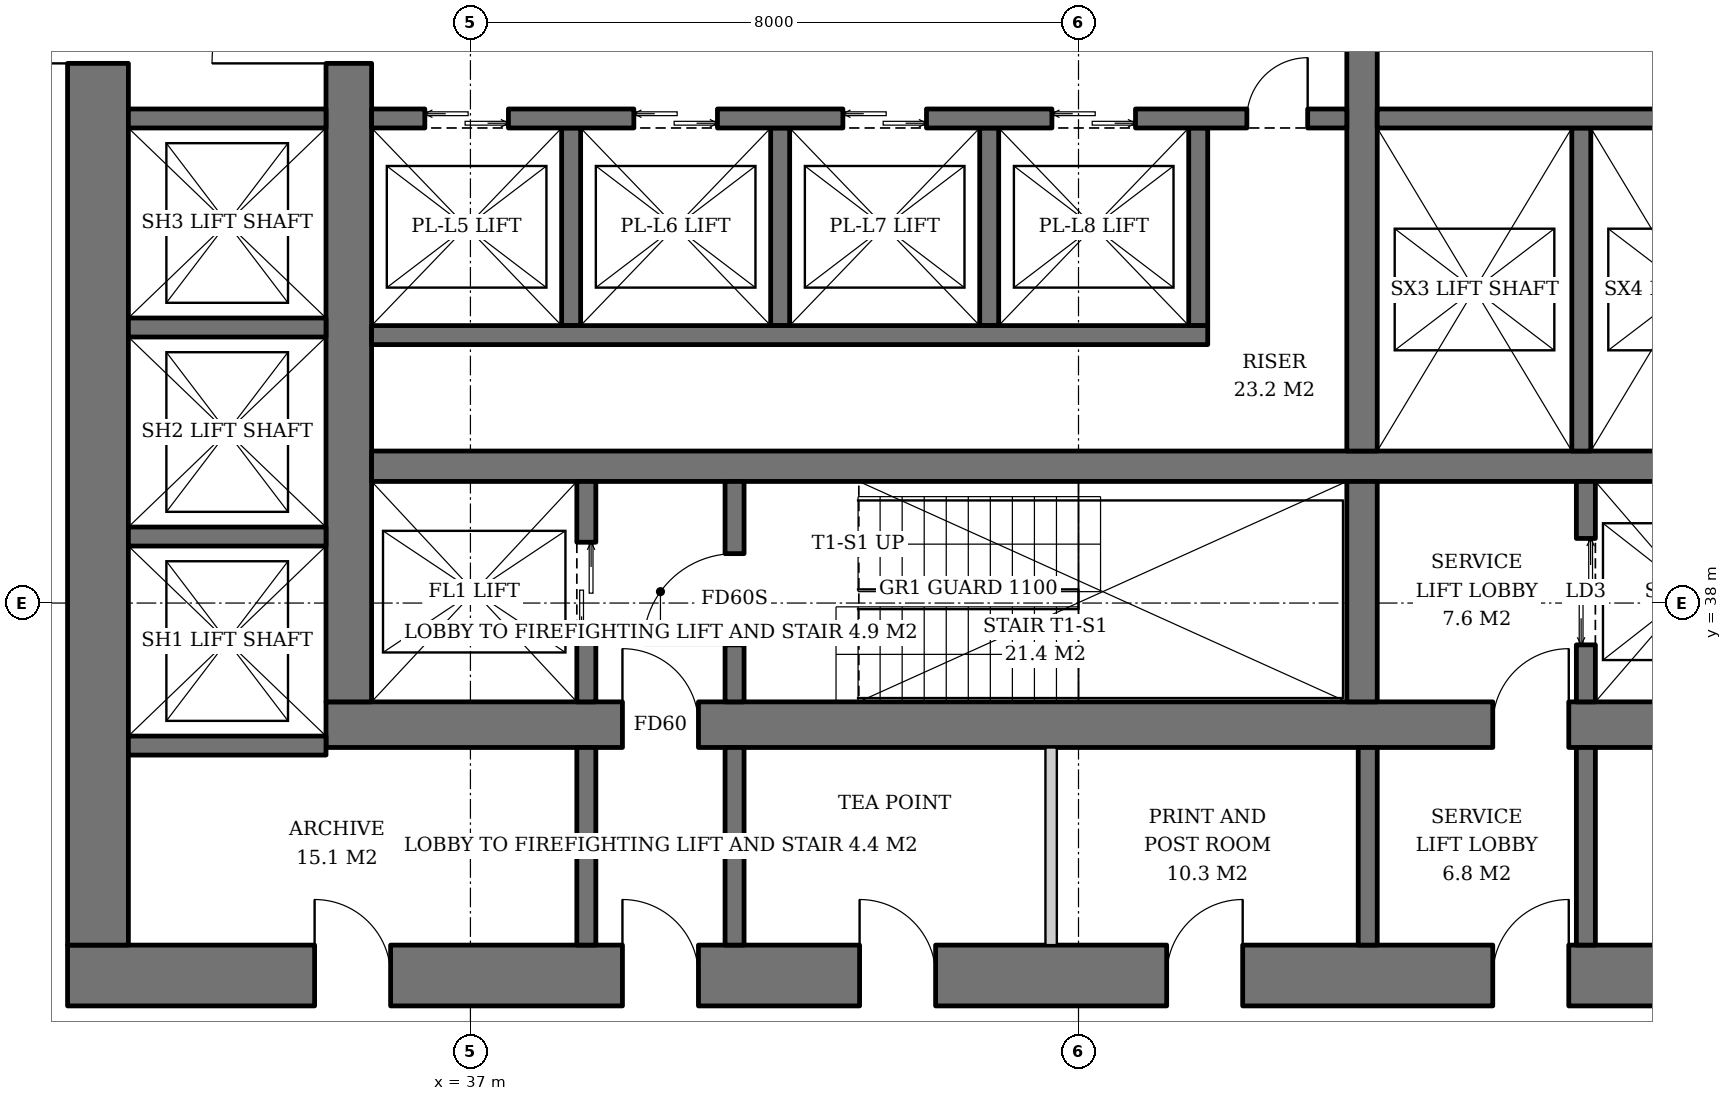
"""IFC4 building model, lengths in metres.
Left out: names, types, materials, properties, quantities, classifications, styles, units other than length and angle.
Written with IfcOpenShell. Run it as: python <this file> out.ifc"""

import sys

from ifc_helpers import new_model, si_unit, direction, frame, frame_2d, origin, place, context, subcontext, project, spatial, rectangle, extrude, element, fill, save


model = new_model("IFC4")
c1 = context("Model", 3, precision=1e-05, world=origin(), true_north=direction((0.0, 1.0)))
c2 = subcontext(c1, "Body", "Model", "MODEL_VIEW")
j1 = project(units=[si_unit("LENGTHUNIT", "METRE"), si_unit("PLANEANGLEUNIT", "RADIAN")], contexts=[c1])
p1 = place(None, origin())
s1 = spatial("IfcSite", under=j1, at=p1, CompositionType="ELEMENT")
p2 = place(p1, origin())
s2 = spatial("IfcBuilding", under=s1, at=p2, CompositionType="ELEMENT")
p3 = place(p2, frame((0.0, 0.0, 74.2)))
s3 = spatial("IfcBuildingStorey", under=s2, at=p3, CompositionType="ELEMENT", Elevation=74.2)
p4 = place(p3, frame((35.1, 36.4, 0.0), z_axis=(0.0, 0.0, 1.0), x_axis=(1.0, 0.0, 0.0)))
e1 = element("IfcWall", 1, at=p4, inside=s3, PredefinedType="SHEAR", context=c2, shape_type="SweptSolid", body=[
    extrude(rectangle(XDim=19.8, YDim=0.6, at=frame_2d((9.9, 0.0))), origin(), (0.0, 0.0, 1.0), 3.8),
])
p5 = place(p4, frame((3.9, 0.0, 0.0)))
e2 = element("IfcOpeningElement", 2, at=p5, cuts=e1, PredefinedType="OPENING", context=c2, shape_type="SweptSolid", body=[
    extrude(rectangle(XDim=1.0, YDim=2.1, at=frame_2d((0.5, 1.05))), frame((0.0, 0.31, 0.0), z_axis=(0.0, -1.0, 0.0), x_axis=(1.0, 0.0, 0.0)), (0.0, 0.0, 1.0), 0.62),
])
p6 = place(p4, frame((15.35, 0.0, 0.0)))
e3 = element("IfcOpeningElement", 3, at=p6, cuts=e1, PredefinedType="OPENING", context=c2, shape_type="SweptSolid", body=[
    extrude(rectangle(XDim=1.0, YDim=2.1, at=frame_2d((0.5, 1.05))), frame((0.0, 0.31, 0.0), z_axis=(0.0, -1.0, 0.0), x_axis=(1.0, 0.0, 0.0)), (0.0, 0.0, 1.0), 0.62),
])
p7 = place(p3, frame((35.4, 36.7, 0.0), z_axis=(0.0, 0.0, 1.0), x_axis=(0.0, 1.0, 0.0)))
e4 = element("IfcWall", 4, at=p7, inside=s3, PredefinedType="SHEAR", context=c2, shape_type="SweptSolid", body=[
    extrude(rectangle(XDim=18.6, YDim=0.6, at=frame_2d((9.3, 0.0))), origin(), (0.0, 0.0, 1.0), 3.8),
])
p8 = place(p7, frame((8.4, 0.0, 0.0)))
e5 = element("IfcOpeningElement", 5, at=p8, cuts=e4, PredefinedType="OPENING", context=c2, shape_type="SweptSolid", body=[
    extrude(rectangle(XDim=1.8, YDim=2.4, at=frame_2d((0.9, 1.2))), frame((0.0, 0.31, 0.0), z_axis=(0.0, -1.0, 0.0), x_axis=(1.0, 0.0, 0.0)), (0.0, 0.0, 1.0), 0.62),
])
p9 = place(p3, frame((31.7, 33.1, 0.0), z_axis=(0.0, 0.0, 1.0), x_axis=(1.0, 0.0, 0.0)))
e6 = element("IfcWall", 6, at=p9, inside=s3, PredefinedType="SHEAR", context=c2, shape_type="SweptSolid", body=[
    extrude(rectangle(XDim=26.6, YDim=0.8, at=frame_2d((13.3, 0.0))), origin(), (0.0, 0.0, 1.0), 3.8),
])
p10 = place(p9, frame((7.3, 0.0, 0.0)))
e7 = element("IfcOpeningElement", 7, at=p10, cuts=e6, PredefinedType="OPENING", context=c2, shape_type="SweptSolid", body=[
    extrude(rectangle(XDim=1.0, YDim=2.1, at=frame_2d((0.5, 1.05))), frame((0.0, 0.41, 0.0), z_axis=(0.0, -1.0, 0.0), x_axis=(1.0, 0.0, 0.0)), (0.0, 0.0, 1.0), 0.82),
])
p11 = place(p9, frame((18.75, 0.0, 0.0)))
e8 = element("IfcOpeningElement", 8, at=p11, cuts=e6, PredefinedType="OPENING", context=c2, shape_type="SweptSolid", body=[
    extrude(rectangle(XDim=1.0, YDim=2.1, at=frame_2d((0.5, 1.05))), frame((0.0, 0.41, 0.0), z_axis=(0.0, -1.0, 0.0), x_axis=(1.0, 0.0, 0.0)), (0.0, 0.0, 1.0), 0.82),
])
p12 = place(p9, frame((3.25, 0.0, 0.0)))
e9 = element("IfcOpeningElement", 9, at=p12, cuts=e6, PredefinedType="OPENING", context=c2, shape_type="SweptSolid", body=[
    extrude(rectangle(XDim=1.0, YDim=2.1, at=frame_2d((0.5, 1.05))), frame((0.0, 0.41, 0.0), z_axis=(0.0, -1.0, 0.0), x_axis=(1.0, 0.0, 0.0)), (0.0, 0.0, 1.0), 0.82),
])
p13 = place(p9, frame((10.42, 0.0, 0.0)))
e10 = element("IfcOpeningElement", 10, at=p13, cuts=e6, PredefinedType="OPENING", context=c2, shape_type="SweptSolid", body=[
    extrude(rectangle(XDim=1.0, YDim=2.1, at=frame_2d((0.5, 1.05))), frame((0.0, 0.41, 0.0), z_axis=(0.0, -1.0, 0.0), x_axis=(1.0, 0.0, 0.0)), (0.0, 0.0, 1.0), 0.82),
])
p14 = place(p9, frame((14.46, 0.0, 0.0)))
e11 = element("IfcOpeningElement", 11, at=p14, cuts=e6, PredefinedType="OPENING", context=c2, shape_type="SweptSolid", body=[
    extrude(rectangle(XDim=1.0, YDim=2.1, at=frame_2d((0.5, 1.05))), frame((0.0, 0.41, 0.0), z_axis=(0.0, -1.0, 0.0), x_axis=(1.0, 0.0, 0.0)), (0.0, 0.0, 1.0), 0.82),
])
p15 = place(p9, frame((22.45, 0.0, 0.0)))
e12 = element("IfcOpeningElement", 12, at=p15, cuts=e6, PredefinedType="OPENING", context=c2, shape_type="SweptSolid", body=[
    extrude(rectangle(XDim=1.0, YDim=2.1, at=frame_2d((0.5, 1.05))), frame((0.0, 0.41, 0.0), z_axis=(0.0, -1.0, 0.0), x_axis=(1.0, 0.0, 0.0)), (0.0, 0.0, 1.0), 0.82),
])
p16 = place(p3, frame((32.1, 33.5, 0.0), z_axis=(0.0, 0.0, 1.0), x_axis=(0.0, 1.0, 0.0)))
e13 = element("IfcWall", 13, at=p16, inside=s3, PredefinedType="SHEAR", context=c2, shape_type="SweptSolid", body=[
    extrude(rectangle(XDim=25.0, YDim=0.8, at=frame_2d((12.5, 0.0))), origin(), (0.0, 0.0, 1.0), 3.8),
])
p17 = place(p16, frame((11.6, 0.0, 0.0)))
e14 = element("IfcOpeningElement", 14, at=p17, cuts=e13, PredefinedType="OPENING", context=c2, shape_type="SweptSolid", body=[
    extrude(rectangle(XDim=1.8, YDim=2.4, at=frame_2d((0.9, 1.2))), frame((0.0, 0.41, 0.0), z_axis=(0.0, -1.0, 0.0), x_axis=(1.0, 0.0, 0.0)), (0.0, 0.0, 1.0), 0.82),
])
p18 = place(p3, frame((35.7, 39.8, 0.0), z_axis=(0.0, 0.0, 1.0), x_axis=(1.0, 0.0, 0.0)))
e15 = element("IfcWall", 15, at=p18, inside=s3, PredefinedType="SHEAR", context=c2, shape_type="SweptSolid", body=[
    extrude(rectangle(XDim=18.6, YDim=0.4, at=frame_2d((9.3, 0.0))), origin(), (0.0, 0.0, 1.0), 3.8),
])
p19 = place(p3, frame((48.73, 36.7, 0.0), z_axis=(0.0, 0.0, 1.0), x_axis=(0.0, 1.0, 0.0)))
e16 = element("IfcWall", 16, at=p19, inside=s3, PredefinedType="SHEAR", context=c2, shape_type="SweptSolid", body=[
    extrude(rectangle(XDim=2.9, YDim=0.4, at=frame_2d((1.45, 0.0))), origin(), (0.0, 0.0, 1.0), 3.8),
])
p20 = place(p3, frame((48.73, 40.0, 0.0), z_axis=(0.0, 0.0, 1.0), x_axis=(0.0, 1.0, 0.0)))
e17 = element("IfcWall", 17, at=p20, inside=s3, PredefinedType="SHEAR", context=c2, shape_type="SweptSolid", body=[
    extrude(rectangle(XDim=12.0, YDim=0.4, at=frame_2d((6.0, 0.0))), origin(), (0.0, 0.0, 1.0), 3.8),
])
p21 = place(p3, frame((38.525, 36.7, 0.0), z_axis=(0.0, 0.0, 1.0), x_axis=(0.0, 1.0, 0.0)))
e18 = element("IfcWall", 18, at=p21, inside=s3, PredefinedType="SHEAR", context=c2, shape_type="SweptSolid", body=[
    extrude(rectangle(XDim=2.9, YDim=0.25, at=frame_2d((1.45, 0.0))), origin(), (0.0, 0.0, 1.0), 3.8),
])
p22 = place(p21, frame((0.8, 0.0, 0.0)))
e19 = element("IfcOpeningElement", 19, at=p22, cuts=e18, PredefinedType="OPENING", context=c2, shape_type="SweptSolid", body=[
    extrude(rectangle(XDim=1.3, YDim=2.2, at=frame_2d((0.65, 1.1))), frame((0.0, 0.135, 0.0), z_axis=(0.0, -1.0, 0.0), x_axis=(1.0, 0.0, 0.0)), (0.0, 0.0, 1.0), 0.27),
])
p23 = place(p3, frame((40.475, 36.7, 0.0), z_axis=(0.0, 0.0, 1.0), x_axis=(0.0, 1.0, 0.0)))
e20 = element("IfcWall", 20, at=p23, inside=s3, PredefinedType="SHEAR", context=c2, shape_type="SweptSolid", body=[
    extrude(rectangle(XDim=2.9, YDim=0.25, at=frame_2d((1.45, 0.0))), origin(), (0.0, 0.0, 1.0), 3.8),
])
p24 = place(p23, frame((0.75, 0.0, 0.0)))
e21 = element("IfcOpeningElement", 21, at=p24, cuts=e20, PredefinedType="OPENING", context=c2, shape_type="SweptSolid", body=[
    extrude(rectangle(XDim=1.2, YDim=2.1, at=frame_2d((0.6, 1.05))), frame((0.0, 0.135, 0.0), z_axis=(0.0, -1.0, 0.0), x_axis=(1.0, 0.0, 0.0)), (0.0, 0.0, 1.0), 0.27),
])
p25 = place(p3, frame((51.675, 36.7, 0.0), z_axis=(0.0, 0.0, 1.0), x_axis=(0.0, 1.0, 0.0)))
e22 = element("IfcWall", 22, at=p25, inside=s3, PredefinedType="SHEAR", context=c2, shape_type="SweptSolid", body=[
    extrude(rectangle(XDim=2.9, YDim=0.25, at=frame_2d((1.45, 0.0))), origin(), (0.0, 0.0, 1.0), 3.8),
])
p26 = place(p25, frame((0.75, 0.0, 0.0)))
e23 = element("IfcOpeningElement", 23, at=p26, cuts=e22, PredefinedType="OPENING", context=c2, shape_type="SweptSolid", body=[
    extrude(rectangle(XDim=1.4, YDim=2.4, at=frame_2d((0.7, 1.2))), frame((0.0, 0.135, 0.0), z_axis=(0.0, -1.0, 0.0), x_axis=(1.0, 0.0, 0.0)), (0.0, 0.0, 1.0), 0.27),
])
for number, where, z_axis, x_axis in (
    (24, (38.325, 44.25, 0.0), (0.0, 0.0, 1.0), (0.0, -1.0, 0.0)),
    (25, (41.075, 44.25, 0.0), (0.0, 0.0, 1.0), (0.0, -1.0, 0.0)),
    (26, (43.825, 44.25, 0.0), (0.0, 0.0, 1.0), (0.0, -1.0, 0.0)),
    (27, (46.575, 44.25, 0.0), (0.0, 0.0, 1.0), (0.0, -1.0, 0.0)),
):
    element("IfcWall", number, at=place(p3, frame(where, z_axis=z_axis, x_axis=x_axis)), inside=s3, PredefinedType="SHEAR", context=c2, shape_type="SweptSolid", body=[
        extrude(rectangle(XDim=2.6, YDim=0.25, at=frame_2d((1.3, 0.0))), origin(), (0.0, 0.0, 1.0), 3.8),
    ])
p27 = place(p3, frame((35.7, 41.525, 0.0), z_axis=(0.0, 0.0, 1.0), x_axis=(1.0, 0.0, 0.0)))
e28 = element("IfcWall", 28, at=p27, inside=s3, PredefinedType="SHEAR", context=c2, shape_type="SweptSolid", body=[
    extrude(rectangle(XDim=11.0, YDim=0.25, at=frame_2d((5.5, 0.0))), origin(), (0.0, 0.0, 1.0), 3.8),
])
p28 = place(p3, frame((35.7, 44.375, 0.0), z_axis=(0.0, 0.0, 1.0), x_axis=(1.0, 0.0, 0.0)))
e29 = element("IfcWall", 29, at=p28, inside=s3, PredefinedType="SHEAR", context=c2, shape_type="SweptSolid", body=[
    extrude(rectangle(XDim=12.83, YDim=0.25, at=frame_2d((6.415, 0.0))), origin(), (0.0, 0.0, 1.0), 3.8),
])
p29 = place(p28, frame((0.7, 0.0, 0.0)))
e30 = element("IfcOpeningElement", 30, at=p29, cuts=e29, PredefinedType="OPENING", context=c2, shape_type="SweptSolid", body=[
    extrude(rectangle(XDim=1.1, YDim=2.2, at=frame_2d((0.55, 1.1))), frame((0.0, 0.135, 0.0), z_axis=(0.0, -1.0, 0.0), x_axis=(1.0, 0.0, 0.0)), (0.0, 0.0, 1.0), 0.27),
])
p30 = place(p28, frame((3.45, 0.0, 0.0)))
e31 = element("IfcOpeningElement", 31, at=p30, cuts=e29, PredefinedType="OPENING", context=c2, shape_type="SweptSolid", body=[
    extrude(rectangle(XDim=1.1, YDim=2.2, at=frame_2d((0.55, 1.1))), frame((0.0, 0.135, 0.0), z_axis=(0.0, -1.0, 0.0), x_axis=(1.0, 0.0, 0.0)), (0.0, 0.0, 1.0), 0.27),
])
p31 = place(p28, frame((6.2, 0.0, 0.0)))
e32 = element("IfcOpeningElement", 32, at=p31, cuts=e29, PredefinedType="OPENING", context=c2, shape_type="SweptSolid", body=[
    extrude(rectangle(XDim=1.1, YDim=2.2, at=frame_2d((0.55, 1.1))), frame((0.0, 0.135, 0.0), z_axis=(0.0, -1.0, 0.0), x_axis=(1.0, 0.0, 0.0)), (0.0, 0.0, 1.0), 0.27),
])
p32 = place(p28, frame((8.95, 0.0, 0.0)))
e33 = element("IfcOpeningElement", 33, at=p32, cuts=e29, PredefinedType="OPENING", context=c2, shape_type="SweptSolid", body=[
    extrude(rectangle(XDim=1.1, YDim=2.2, at=frame_2d((0.55, 1.1))), frame((0.0, 0.135, 0.0), z_axis=(0.0, -1.0, 0.0), x_axis=(1.0, 0.0, 0.0)), (0.0, 0.0, 1.0), 0.27),
])
p33 = place(p28, frame((11.515, 0.0, 0.0)))
e34 = element("IfcOpeningElement", 34, at=p33, cuts=e29, PredefinedType="OPENING", context=c2, shape_type="SweptSolid", body=[
    extrude(rectangle(XDim=0.8, YDim=2.0, at=frame_2d((0.4, 1.0))), frame((0.0, 0.135, 0.0), z_axis=(0.0, -1.0, 0.0), x_axis=(1.0, 0.0, 0.0)), (0.0, 0.0, 1.0), 0.27),
])
p34 = place(p3, frame((51.615, 44.25, 0.0), z_axis=(0.0, 0.0, 1.0), x_axis=(0.0, -1.0, 0.0)))
e35 = element("IfcWall", 35, at=p34, inside=s3, PredefinedType="SHEAR", context=c2, shape_type="SweptSolid", body=[
    extrude(rectangle(XDim=4.25, YDim=0.25, at=frame_2d((2.125, 0.0))), origin(), (0.0, 0.0, 1.0), 3.8),
])
p35 = place(p3, frame((48.93, 44.375, 0.0), z_axis=(0.0, 0.0, 1.0), x_axis=(1.0, 0.0, 0.0)))
e36 = element("IfcWall", 36, at=p35, inside=s3, PredefinedType="SHEAR", context=c2, shape_type="SweptSolid", body=[
    extrude(rectangle(XDim=5.37, YDim=0.25, at=frame_2d((2.685, 0.0))), origin(), (0.0, 0.0, 1.0), 3.8),
])
for number, where, z_axis, x_axis in (
    (37, (32.5, 36.125, 0.0), (0.0, 0.0, 1.0), (1.0, 0.0, 0.0)),
    (38, (32.5, 38.875, 0.0), (0.0, 0.0, 1.0), (1.0, 0.0, 0.0)),
    (39, (32.5, 41.625, 0.0), (0.0, 0.0, 1.0), (1.0, 0.0, 0.0)),
    (40, (32.5, 44.375, 0.0), (0.0, 0.0, 1.0), (1.0, 0.0, 0.0)),
):
    element("IfcWall", number, at=place(p3, frame(where, z_axis=z_axis, x_axis=x_axis)), inside=s3, PredefinedType="SHEAR", context=c2, shape_type="SweptSolid", body=[
        extrude(rectangle(XDim=2.6, YDim=0.25, at=frame_2d((1.3, 0.0))), origin(), (0.0, 0.0, 1.0), 3.8),
    ])
for number, where, z_axis, x_axis in (
    (41, (38.525, 33.5, 0.0), (0.0, 0.0, 1.0), (0.0, 1.0, 0.0)),
    (42, (40.475, 33.5, 0.0), (0.0, 0.0, 1.0), (0.0, 1.0, 0.0)),
    (43, (48.805, 33.5, 0.0), (0.0, 0.0, 1.0), (0.0, 1.0, 0.0)),
    (44, (51.675, 33.5, 0.0), (0.0, 0.0, 1.0), (0.0, 1.0, 0.0)),
):
    element("IfcWall", number, at=place(p3, frame(where, z_axis=z_axis, x_axis=x_axis)), inside=s3, PredefinedType="SOLIDWALL", context=c2, shape_type="SweptSolid", body=[
        extrude(rectangle(XDim=2.6, YDim=0.25, at=frame_2d((1.3, 0.0))), origin(), (0.0, 0.0, 1.0), 3.62),
    ])
p36 = place(p3, frame((44.64, 33.5, 0.0), z_axis=(0.0, 0.0, 1.0), x_axis=(0.0, 1.0, 0.0)))
e45 = element("IfcWall", 45, at=p36, inside=s3, PredefinedType="SOLIDWALL", context=c2, shape_type="SweptSolid", body=[
    extrude(rectangle(XDim=2.6, YDim=0.15, at=frame_2d((1.3, 0.0))), origin(), (0.0, 0.0, 1.0), 3.62),
])
p37 = place(p22, origin())
e46 = element("IfcDoor", 46, at=p37, inside=s3, OperationType="DOUBLE_DOOR_SLIDING", PredefinedType="DOOR", context=c2, shape_type="SweptSolid", body=[
    extrude(rectangle(XDim=1.3, YDim=2.2, at=frame_2d((0.65, 1.1))), frame((0.0, 0.025, 0.0), z_axis=(0.0, -1.0, 0.0), x_axis=(1.0, 0.0, 0.0)), (0.0, 0.0, 1.0), 0.05),
])
fill(e19, e46)
p38 = place(p24, origin())
e47 = element("IfcDoor", 47, at=p38, inside=s3, OperationType="SINGLE_SWING_LEFT", PredefinedType="DOOR", context=c2, shape_type="SweptSolid", body=[
    extrude(rectangle(XDim=1.2, YDim=2.1, at=frame_2d((0.6, 1.05))), frame((0.0, 0.025, 0.0), z_axis=(0.0, -1.0, 0.0), x_axis=(1.0, 0.0, 0.0)), (0.0, 0.0, 1.0), 0.05),
])
fill(e21, e47)
p39 = place(p26, origin())
e48 = element("IfcDoor", 48, at=p39, inside=s3, OperationType="DOUBLE_DOOR_SLIDING", PredefinedType="DOOR", context=c2, shape_type="SweptSolid", body=[
    extrude(rectangle(XDim=1.4, YDim=2.4, at=frame_2d((0.7, 1.2))), frame((0.0, 0.025, 0.0), z_axis=(0.0, -1.0, 0.0), x_axis=(1.0, 0.0, 0.0)), (0.0, 0.0, 1.0), 0.05),
])
fill(e23, e48)
p40 = place(p29, origin())
e49 = element("IfcDoor", 49, at=p40, inside=s3, OperationType="DOUBLE_DOOR_SLIDING", PredefinedType="DOOR", context=c2, shape_type="SweptSolid", body=[
    extrude(rectangle(XDim=1.1, YDim=2.2, at=frame_2d((0.55, 1.1))), frame((0.0, 0.025, 0.0), z_axis=(0.0, -1.0, 0.0), x_axis=(1.0, 0.0, 0.0)), (0.0, 0.0, 1.0), 0.05),
])
fill(e30, e49)
p41 = place(p30, origin())
e50 = element("IfcDoor", 50, at=p41, inside=s3, OperationType="DOUBLE_DOOR_SLIDING", PredefinedType="DOOR", context=c2, shape_type="SweptSolid", body=[
    extrude(rectangle(XDim=1.1, YDim=2.2, at=frame_2d((0.55, 1.1))), frame((0.0, 0.025, 0.0), z_axis=(0.0, -1.0, 0.0), x_axis=(1.0, 0.0, 0.0)), (0.0, 0.0, 1.0), 0.05),
])
fill(e31, e50)
p42 = place(p31, origin())
e51 = element("IfcDoor", 51, at=p42, inside=s3, OperationType="DOUBLE_DOOR_SLIDING", PredefinedType="DOOR", context=c2, shape_type="SweptSolid", body=[
    extrude(rectangle(XDim=1.1, YDim=2.2, at=frame_2d((0.55, 1.1))), frame((0.0, 0.025, 0.0), z_axis=(0.0, -1.0, 0.0), x_axis=(1.0, 0.0, 0.0)), (0.0, 0.0, 1.0), 0.05),
])
fill(e32, e51)
p43 = place(p32, origin())
e52 = element("IfcDoor", 52, at=p43, inside=s3, OperationType="DOUBLE_DOOR_SLIDING", PredefinedType="DOOR", context=c2, shape_type="SweptSolid", body=[
    extrude(rectangle(XDim=1.1, YDim=2.2, at=frame_2d((0.55, 1.1))), frame((0.0, 0.025, 0.0), z_axis=(0.0, -1.0, 0.0), x_axis=(1.0, 0.0, 0.0)), (0.0, 0.0, 1.0), 0.05),
])
fill(e33, e52)
p44 = place(p33, origin())
e53 = element("IfcDoor", 53, at=p44, inside=s3, OperationType="SINGLE_SWING_RIGHT", PredefinedType="DOOR", context=c2, shape_type="SweptSolid", body=[
    extrude(rectangle(XDim=0.8, YDim=2.0, at=frame_2d((0.4, 1.0))), frame((0.0, 0.025, 0.0), z_axis=(0.0, -1.0, 0.0), x_axis=(1.0, 0.0, 0.0)), (0.0, 0.0, 1.0), 0.05),
])
fill(e34, e53)
p45 = place(p5, origin())
e54 = element("IfcDoor", 54, at=p45, inside=s3, OperationType="SINGLE_SWING_LEFT", PredefinedType="DOOR", context=c2, shape_type="SweptSolid", body=[
    extrude(rectangle(XDim=1.0, YDim=2.1, at=frame_2d((0.5, 1.05))), frame((0.0, 0.025, 0.0), z_axis=(0.0, -1.0, 0.0), x_axis=(1.0, 0.0, 0.0)), (0.0, 0.0, 1.0), 0.05),
])
fill(e2, e54)
p46 = place(p8, origin())
e55 = element("IfcDoor", 55, at=p46, inside=s3, OperationType="DOUBLE_DOOR_SINGLE_SWING", PredefinedType="DOOR", context=c2, shape_type="SweptSolid", body=[
    extrude(rectangle(XDim=1.8, YDim=2.4, at=frame_2d((0.9, 1.2))), frame((0.0, 0.025, 0.0), z_axis=(0.0, -1.0, 0.0), x_axis=(1.0, 0.0, 0.0)), (0.0, 0.0, 1.0), 0.05),
])
fill(e5, e55)
p47 = place(p6, origin())
e56 = element("IfcDoor", 56, at=p47, inside=s3, OperationType="SINGLE_SWING_RIGHT", PredefinedType="DOOR", context=c2, shape_type="SweptSolid", body=[
    extrude(rectangle(XDim=1.0, YDim=2.1, at=frame_2d((0.5, 1.05))), frame((0.0, 0.025, 0.0), z_axis=(0.0, -1.0, 0.0), x_axis=(1.0, 0.0, 0.0)), (0.0, 0.0, 1.0), 0.05),
])
fill(e3, e56)
p48 = place(p17, origin())
e57 = element("IfcDoor", 57, at=p48, inside=s3, OperationType="DOUBLE_DOOR_SINGLE_SWING", PredefinedType="DOOR", context=c2, shape_type="SweptSolid", body=[
    extrude(rectangle(XDim=1.8, YDim=2.4, at=frame_2d((0.9, 1.2))), frame((0.0, 0.025, 0.0), z_axis=(0.0, -1.0, 0.0), x_axis=(1.0, 0.0, 0.0)), (0.0, 0.0, 1.0), 0.05),
])
fill(e14, e57)
p49 = place(p10, origin())
e58 = element("IfcDoor", 58, at=p49, inside=s3, OperationType="SINGLE_SWING_LEFT", PredefinedType="DOOR", context=c2, shape_type="SweptSolid", body=[
    extrude(rectangle(XDim=1.0, YDim=2.1, at=frame_2d((0.5, 1.05))), frame((0.0, 0.025, 0.0), z_axis=(0.0, -1.0, 0.0), x_axis=(1.0, 0.0, 0.0)), (0.0, 0.0, 1.0), 0.05),
])
fill(e7, e58)
p50 = place(p11, origin())
e59 = element("IfcDoor", 59, at=p50, inside=s3, OperationType="SINGLE_SWING_RIGHT", PredefinedType="DOOR", context=c2, shape_type="SweptSolid", body=[
    extrude(rectangle(XDim=1.0, YDim=2.1, at=frame_2d((0.5, 1.05))), frame((0.0, 0.025, 0.0), z_axis=(0.0, -1.0, 0.0), x_axis=(1.0, 0.0, 0.0)), (0.0, 0.0, 1.0), 0.05),
])
fill(e8, e59)
p51 = place(p12, origin())
e60 = element("IfcDoor", 60, at=p51, inside=s3, OperationType="SINGLE_SWING_LEFT", PredefinedType="DOOR", context=c2, shape_type="SweptSolid", body=[
    extrude(rectangle(XDim=1.0, YDim=2.1, at=frame_2d((0.5, 1.05))), frame((0.0, 0.39, 0.0), z_axis=(0.0, -1.0, 0.0), x_axis=(1.0, 0.0, 0.0)), (0.0, 0.0, 1.0), 0.05),
])
fill(e9, e60)
p52 = place(p13, origin())
e61 = element("IfcDoor", 61, at=p52, inside=s3, OperationType="SINGLE_SWING_LEFT", PredefinedType="DOOR", context=c2, shape_type="SweptSolid", body=[
    extrude(rectangle(XDim=1.0, YDim=2.1, at=frame_2d((0.5, 1.05))), frame((0.0, 0.39, 0.0), z_axis=(0.0, -1.0, 0.0), x_axis=(1.0, 0.0, 0.0)), (0.0, 0.0, 1.0), 0.05),
])
fill(e10, e61)
p53 = place(p14, origin())
e62 = element("IfcDoor", 62, at=p53, inside=s3, OperationType="SINGLE_SWING_RIGHT", PredefinedType="DOOR", context=c2, shape_type="SweptSolid", body=[
    extrude(rectangle(XDim=1.0, YDim=2.1, at=frame_2d((0.5, 1.05))), frame((0.0, 0.39, 0.0), z_axis=(0.0, -1.0, 0.0), x_axis=(1.0, 0.0, 0.0)), (0.0, 0.0, 1.0), 0.05),
])
fill(e11, e62)
save(model, sys.argv[1])
